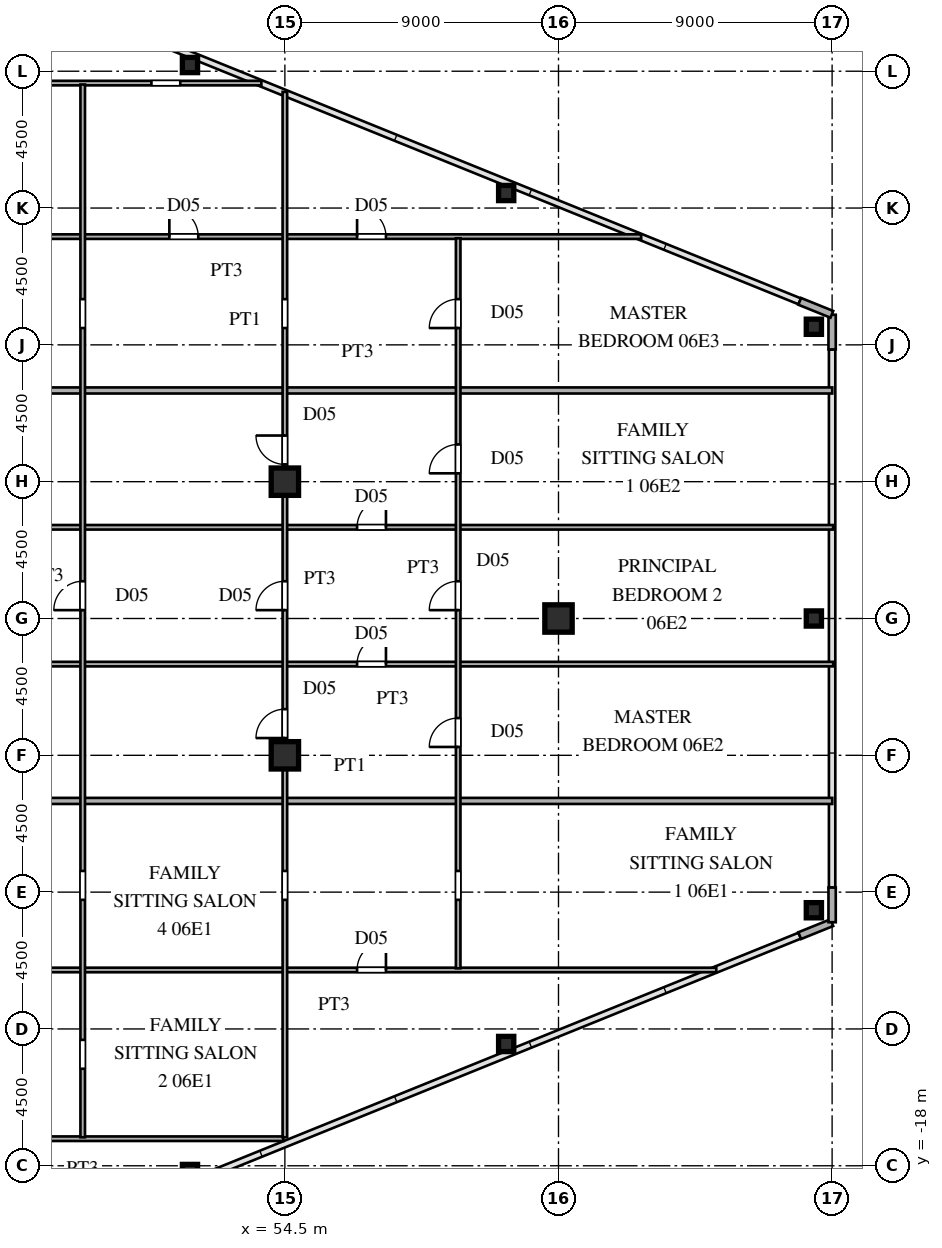
"""IFC4 building model, lengths in metres.
Left out: names, types, materials, properties, quantities, classifications, styles, units other than length and angle.
Written with IfcOpenShell. Run it as: python <this file> out.ifc"""

import sys

from ifc_helpers import new_model, si_unit, direction, frame, frame_2d, origin, origin_2d, place, context, subcontext, project, spatial, rectangle, hollow_rectangle, i_section, extrude, source, transform, mapped, element, fill, save


model = new_model("IFC4")
c1 = context("Model", 3, precision=1e-05, world=origin(), true_north=direction((0.0, 1.0)))
c2 = subcontext(c1, "Body", "Model", "MODEL_VIEW")
j1 = project(units=[si_unit("LENGTHUNIT", "METRE"), si_unit("PLANEANGLEUNIT", "RADIAN")], contexts=[c1])
p1 = place(None, origin())
s1 = spatial("IfcSite", under=j1, at=p1, CompositionType="ELEMENT")
p2 = place(p1, origin())
s2 = spatial("IfcBuilding", under=s1, at=p2, CompositionType="ELEMENT")
p3 = place(p2, frame((0.0, 0.0, 26.1)))
s3 = spatial("IfcBuildingStorey", under=s2, at=p3, CompositionType="ELEMENT", Elevation=26.1)
m1 = source(origin(), c2, "Body", "SweptSolid", [
    extrude(i_section(OverallWidth=0.9, OverallDepth=0.9, WebThickness=0.036, FlangeThickness=0.055, at=origin_2d()), origin(), (0.0, 0.0, 1.0), 3.6),
])
for number, where, z_axis, x_axis in (
    (1, (54.5, -4.5, 0.0), (0.0, 0.0, 1.0), (1.0, 0.0, 0.0)),
    (2, (54.5, 4.5, 0.0), (0.0, 0.0, 1.0), (1.0, 0.0, 0.0)),
    (3, (63.5, 0.0, 0.0), (0.0, 0.0, 1.0), (1.0, 0.0, 0.0)),
):
    element("IfcColumn", number, at=place(p3, frame(where, z_axis=z_axis, x_axis=x_axis)), inside=s3, PredefinedType="COLUMN", context=c2, shape_type="MappedRepresentation", body=[
        mapped(m1, transform((0.0, 0.0, 0.0), scale=1.0)),
    ])
m2 = source(origin(), c2, "Body", "SweptSolid", [
    extrude(hollow_rectangle(XDim=0.5, YDim=0.5, WallThickness=0.02, at=origin_2d()), origin(), (0.0, 0.0, 1.0), 3.6),
])
for number, where, z_axis, x_axis in (
    (4, (71.9, -9.596, 0.0), (0.0, 0.0, 1.0), (1.0, 0.0, 0.0)),
    (5, (71.9, 9.596, 0.0), (0.0, 0.0, 1.0), (1.0, 0.0, 0.0)),
    (6, (51.378, -18.204, 0.0), (0.0, 0.0, 1.0), (1.0, 0.0, 0.0)),
    (7, (61.779, -13.994, 0.0), (0.0, 0.0, 1.0), (1.0, 0.0, 0.0)),
    (8, (51.378, 18.204, 0.0), (0.0, 0.0, 1.0), (1.0, 0.0, 0.0)),
    (9, (61.779, 13.994, 0.0), (0.0, 0.0, 1.0), (1.0, 0.0, 0.0)),
    (10, (71.9, 0.0, 0.0), (0.0, 0.0, 1.0), (1.0, 0.0, 0.0)),
):
    element("IfcColumn", number, at=place(p3, frame(where, z_axis=z_axis, x_axis=x_axis)), inside=s3, PredefinedType="COLUMN", context=c2, shape_type="MappedRepresentation", body=[
        mapped(m2, transform((0.0, 0.0, 0.0), scale=1.0)),
    ])
for number, where, z_axis, x_axis in (
    (11, (71.434, -10.431, 0.0), (0.0, 0.0, 1.0), (0.927, 0.375, 0.0)),
    (12, (72.5, -9.99, 0.0), (0.0, 0.0, 1.0), (0.0, 1.0, 0.0)),
    (13, (72.5, 8.85, 0.0), (0.0, 0.0, 1.0), (0.0, 1.0, 0.0)),
    (14, (72.491, 10.004, 0.0), (0.0, 0.0, 1.0), (-0.927, 0.375, 0.0)),
):
    element("IfcWall", number, at=place(p3, frame(where, z_axis=z_axis, x_axis=x_axis)), inside=s3, PredefinedType="SOLIDWALL", context=c2, shape_type="SweptSolid", body=[
        extrude(rectangle(XDim=1.14, YDim=0.24, at=frame_2d((0.57, 0.0))), origin(), (0.0, 0.0, 1.0), 3.38),
    ])
p4 = place(p3, frame((41.25, -17.11, 0.0), z_axis=(0.0, 0.0, 1.0), x_axis=(1.0, 0.0, 0.0)))
e15 = element("IfcWall", 15, at=p4, inside=s3, PredefinedType="PARTITIONING", context=c2, shape_type="SweptSolid", body=[
    extrude(rectangle(XDim=13.2, YDim=0.15, at=frame_2d((6.6, 0.0))), origin(), (0.0, 0.0, 1.0), 3.38),
])
p5 = place(p4, frame((2.8, 0.0, 0.0)))
e16 = element("IfcOpeningElement", 16, at=p5, cuts=e15, PredefinedType="OPENING", context=c2, shape_type="SweptSolid", body=[
    extrude(rectangle(XDim=0.95, YDim=2.15, at=frame_2d((0.475, 1.075))), frame((0.0, 0.085, 0.0), z_axis=(0.0, -1.0, 0.0), x_axis=(1.0, 0.0, 0.0)), (0.0, 0.0, 1.0), 0.17),
])
p6 = place(p3, frame((41.25, -11.56, 0.0), z_axis=(0.0, 0.0, 1.0), x_axis=(1.0, 0.0, 0.0)))
e17 = element("IfcWall", 17, at=p6, inside=s3, PredefinedType="PARTITIONING", context=c2, shape_type="SweptSolid", body=[
    extrude(rectangle(XDim=27.44, YDim=0.15, at=frame_2d((13.72, 0.0))), origin(), (0.0, 0.0, 1.0), 3.38),
])
p7 = place(p6, frame((2.8, 0.0, 0.0)))
e18 = element("IfcOpeningElement", 18, at=p7, cuts=e17, PredefinedType="OPENING", context=c2, shape_type="SweptSolid", body=[
    extrude(rectangle(XDim=0.95, YDim=2.15, at=frame_2d((0.475, 1.075))), frame((0.0, 0.085, 0.0), z_axis=(0.0, -1.0, 0.0), x_axis=(1.0, 0.0, 0.0)), (0.0, 0.0, 1.0), 0.17),
])
p8 = place(p6, frame((15.625, 0.0, 0.0)))
e19 = element("IfcOpeningElement", 19, at=p8, cuts=e17, PredefinedType="OPENING", context=c2, shape_type="SweptSolid", body=[
    extrude(rectangle(XDim=0.95, YDim=2.15, at=frame_2d((0.475, 1.075))), frame((0.0, 0.085, 0.0), z_axis=(0.0, -1.0, 0.0), x_axis=(1.0, 0.0, 0.0)), (0.0, 0.0, 1.0), 0.17),
])
p9 = place(p3, frame((38.48, -6.0, 0.0), z_axis=(0.0, 0.0, 1.0), x_axis=(1.0, 0.0, 0.0)))
e20 = element("IfcWall", 20, at=p9, inside=s3, PredefinedType="PARTITIONING", context=c2, shape_type="SweptSolid", body=[
    extrude(rectangle(XDim=34.025, YDim=0.2, at=frame_2d((17.012, 0.0))), origin(), (0.0, 0.0, 1.0), 3.38),
])
p10 = place(p3, frame((41.25, -1.5, 0.0), z_axis=(0.0, 0.0, 1.0), x_axis=(1.0, 0.0, 0.0)))
e21 = element("IfcWall", 21, at=p10, inside=s3, PredefinedType="PARTITIONING", context=c2, shape_type="SweptSolid", body=[
    extrude(rectangle(XDim=31.285, YDim=0.15, at=frame_2d((15.643, 0.0))), origin(), (0.0, 0.0, 1.0), 3.38),
])
p11 = place(p10, frame((2.8, 0.0, 0.0)))
e22 = element("IfcOpeningElement", 22, at=p11, cuts=e21, PredefinedType="OPENING", context=c2, shape_type="SweptSolid", body=[
    extrude(rectangle(XDim=0.95, YDim=2.15, at=frame_2d((0.475, 1.075))), frame((0.0, 0.085, 0.0), z_axis=(0.0, -1.0, 0.0), x_axis=(1.0, 0.0, 0.0)), (0.0, 0.0, 1.0), 0.17),
])
p12 = place(p10, frame((15.625, 0.0, 0.0)))
e23 = element("IfcOpeningElement", 23, at=p12, cuts=e21, PredefinedType="OPENING", context=c2, shape_type="SweptSolid", body=[
    extrude(rectangle(XDim=0.95, YDim=2.15, at=frame_2d((0.475, 1.075))), frame((0.0, 0.085, 0.0), z_axis=(0.0, -1.0, 0.0), x_axis=(1.0, 0.0, 0.0)), (0.0, 0.0, 1.0), 0.17),
])
p13 = place(p3, frame((41.25, 3.0, 0.0), z_axis=(0.0, 0.0, 1.0), x_axis=(1.0, 0.0, 0.0)))
e24 = element("IfcWall", 24, at=p13, inside=s3, PredefinedType="PARTITIONING", context=c2, shape_type="SweptSolid", body=[
    extrude(rectangle(XDim=31.285, YDim=0.15, at=frame_2d((15.643, 0.0))), origin(), (0.0, 0.0, 1.0), 3.38),
])
p14 = place(p13, frame((2.8, 0.0, 0.0)))
e25 = element("IfcOpeningElement", 25, at=p14, cuts=e24, PredefinedType="OPENING", context=c2, shape_type="SweptSolid", body=[
    extrude(rectangle(XDim=0.95, YDim=2.15, at=frame_2d((0.475, 1.075))), frame((0.0, 0.085, 0.0), z_axis=(0.0, -1.0, 0.0), x_axis=(1.0, 0.0, 0.0)), (0.0, 0.0, 1.0), 0.17),
])
p15 = place(p13, frame((15.625, 0.0, 0.0)))
e26 = element("IfcOpeningElement", 26, at=p15, cuts=e24, PredefinedType="OPENING", context=c2, shape_type="SweptSolid", body=[
    extrude(rectangle(XDim=0.95, YDim=2.15, at=frame_2d((0.475, 1.075))), frame((0.0, 0.085, 0.0), z_axis=(0.0, -1.0, 0.0), x_axis=(1.0, 0.0, 0.0)), (0.0, 0.0, 1.0), 0.17),
])
p16 = place(p3, frame((38.48, 7.5, 0.0), z_axis=(0.0, 0.0, 1.0), x_axis=(1.0, 0.0, 0.0)))
e27 = element("IfcWall", 27, at=p16, inside=s3, PredefinedType="PARTITIONING", context=c2, shape_type="SweptSolid", body=[
    extrude(rectangle(XDim=34.025, YDim=0.2, at=frame_2d((17.012, 0.0))), origin(), (0.0, 0.0, 1.0), 3.38),
])
p17 = place(p3, frame((41.25, 12.56, 0.0), z_axis=(0.0, 0.0, 1.0), x_axis=(1.0, 0.0, 0.0)))
e28 = element("IfcWall", 28, at=p17, inside=s3, PredefinedType="PARTITIONING", context=c2, shape_type="SweptSolid", body=[
    extrude(rectangle(XDim=24.969, YDim=0.15, at=frame_2d((12.484, 0.0))), origin(), (0.0, 0.0, 1.0), 3.38),
])
p18 = place(p17, frame((2.8, 0.0, 0.0)))
e29 = element("IfcOpeningElement", 29, at=p18, cuts=e28, PredefinedType="OPENING", context=c2, shape_type="SweptSolid", body=[
    extrude(rectangle(XDim=0.95, YDim=2.15, at=frame_2d((0.475, 1.075))), frame((0.0, 0.085, 0.0), z_axis=(0.0, -1.0, 0.0), x_axis=(1.0, 0.0, 0.0)), (0.0, 0.0, 1.0), 0.17),
])
p19 = place(p17, frame((15.625, 0.0, 0.0)))
e30 = element("IfcOpeningElement", 30, at=p19, cuts=e28, PredefinedType="OPENING", context=c2, shape_type="SweptSolid", body=[
    extrude(rectangle(XDim=0.95, YDim=2.15, at=frame_2d((0.475, 1.075))), frame((0.0, 0.085, 0.0), z_axis=(0.0, -1.0, 0.0), x_axis=(1.0, 0.0, 0.0)), (0.0, 0.0, 1.0), 0.17),
])
p20 = place(p17, frame((9.45, 0.0, 0.0)))
e31 = element("IfcOpeningElement", 31, at=p20, cuts=e28, PredefinedType="OPENING", context=c2, shape_type="SweptSolid", body=[
    extrude(rectangle(XDim=0.95, YDim=2.15, at=frame_2d((0.475, 1.075))), frame((0.0, 0.085, 0.0), z_axis=(0.0, -1.0, 0.0), x_axis=(1.0, 0.0, 0.0)), (0.0, 0.0, 1.0), 0.17),
])
p21 = place(p3, frame((41.25, 17.61, 0.0), z_axis=(0.0, 0.0, 1.0), x_axis=(1.0, 0.0, 0.0)))
e32 = element("IfcWall", 32, at=p21, inside=s3, PredefinedType="PARTITIONING", context=c2, shape_type="SweptSolid", body=[
    extrude(rectangle(XDim=12.477, YDim=0.15, at=frame_2d((6.239, 0.0))), origin(), (0.0, 0.0, 1.0), 3.38),
])
p22 = place(p21, frame((8.86, 0.0, 0.0)))
e33 = element("IfcOpeningElement", 33, at=p22, cuts=e32, PredefinedType="OPENING", context=c2, shape_type="SweptSolid", body=[
    extrude(rectangle(XDim=0.95, YDim=2.15, at=frame_2d((0.475, 1.075))), frame((0.0, 0.085, 0.0), z_axis=(0.0, -1.0, 0.0), x_axis=(1.0, 0.0, 0.0)), (0.0, 0.0, 1.0), 0.17),
])
p23 = place(p3, frame((47.85, -17.063, 0.0), z_axis=(0.0, 0.0, 1.0), x_axis=(0.0, 1.0, 0.0)))
e34 = element("IfcWall", 34, at=p23, inside=s3, PredefinedType="PARTITIONING", context=c2, shape_type="SweptSolid", body=[
    extrude(rectangle(XDim=34.626, YDim=0.15, at=frame_2d((17.313, 0.0))), origin(), (0.0, 0.0, 1.0), 3.38),
])
p24 = place(p23, frame((7.81, 0.0, 0.0)))
e35 = element("IfcOpeningElement", 35, at=p24, cuts=e34, PredefinedType="OPENING", context=c2, shape_type="SweptSolid", body=[
    extrude(rectangle(XDim=0.95, YDim=2.15, at=frame_2d((0.475, 1.075))), frame((0.0, 0.085, 0.0), z_axis=(0.0, -1.0, 0.0), x_axis=(1.0, 0.0, 0.0)), (0.0, 0.0, 1.0), 0.17),
])
p25 = place(p23, frame((2.253, 0.0, 0.0)))
e36 = element("IfcOpeningElement", 36, at=p25, cuts=e34, PredefinedType="OPENING", context=c2, shape_type="SweptSolid", body=[
    extrude(rectangle(XDim=0.95, YDim=2.15, at=frame_2d((0.475, 1.075))), frame((0.0, 0.085, 0.0), z_axis=(0.0, -1.0, 0.0), x_axis=(1.0, 0.0, 0.0)), (0.0, 0.0, 1.0), 0.17),
])
p26 = place(p23, frame((17.338, 0.0, 0.0)))
e37 = element("IfcOpeningElement", 37, at=p26, cuts=e34, PredefinedType="OPENING", context=c2, shape_type="SweptSolid", body=[
    extrude(rectangle(XDim=0.95, YDim=2.15, at=frame_2d((0.475, 1.075))), frame((0.0, 0.085, 0.0), z_axis=(0.0, -1.0, 0.0), x_axis=(1.0, 0.0, 0.0)), (0.0, 0.0, 1.0), 0.17),
])
p27 = place(p23, frame((26.616, 0.0, 0.0)))
e38 = element("IfcOpeningElement", 38, at=p27, cuts=e34, PredefinedType="OPENING", context=c2, shape_type="SweptSolid", body=[
    extrude(rectangle(XDim=0.95, YDim=2.15, at=frame_2d((0.475, 1.075))), frame((0.0, 0.085, 0.0), z_axis=(0.0, -1.0, 0.0), x_axis=(1.0, 0.0, 0.0)), (0.0, 0.0, 1.0), 0.17),
])
p28 = place(p3, frame((54.5, -17.063, 0.0), z_axis=(0.0, 0.0, 1.0), x_axis=(0.0, 1.0, 0.0)))
e39 = element("IfcWall", 39, at=p28, inside=s3, PredefinedType="PARTITIONING", context=c2, shape_type="SweptSolid", body=[
    extrude(rectangle(XDim=34.384, YDim=0.15, at=frame_2d((17.192, 0.0))), origin(), (0.0, 0.0, 1.0), 2.68),
])
p29 = place(p28, frame((7.81, 0.0, 0.0)))
e40 = element("IfcOpeningElement", 40, at=p29, cuts=e39, PredefinedType="OPENING", context=c2, shape_type="SweptSolid", body=[
    extrude(rectangle(XDim=0.95, YDim=2.15, at=frame_2d((0.475, 1.075))), frame((0.0, 0.085, 0.0), z_axis=(0.0, -1.0, 0.0), x_axis=(1.0, 0.0, 0.0)), (0.0, 0.0, 1.0), 0.17),
])
p30 = place(p28, frame((17.338, 0.0, 0.0)))
e41 = element("IfcOpeningElement", 41, at=p30, cuts=e39, PredefinedType="OPENING", context=c2, shape_type="SweptSolid", body=[
    extrude(rectangle(XDim=0.95, YDim=2.15, at=frame_2d((0.475, 1.075))), frame((0.0, 0.085, 0.0), z_axis=(0.0, -1.0, 0.0), x_axis=(1.0, 0.0, 0.0)), (0.0, 0.0, 1.0), 0.17),
])
p31 = place(p28, frame((13.131, 0.0, 0.0)))
e42 = element("IfcOpeningElement", 42, at=p31, cuts=e39, PredefinedType="OPENING", context=c2, shape_type="SweptSolid", body=[
    extrude(rectangle(XDim=0.95, YDim=2.15, at=frame_2d((0.475, 1.075))), frame((0.0, 0.085, 0.0), z_axis=(0.0, -1.0, 0.0), x_axis=(1.0, 0.0, 0.0)), (0.0, 0.0, 1.0), 0.17),
])
p32 = place(p28, frame((22.131, 0.0, 0.0)))
e43 = element("IfcOpeningElement", 43, at=p32, cuts=e39, PredefinedType="OPENING", context=c2, shape_type="SweptSolid", body=[
    extrude(rectangle(XDim=0.95, YDim=2.15, at=frame_2d((0.475, 1.075))), frame((0.0, 0.085, 0.0), z_axis=(0.0, -1.0, 0.0), x_axis=(1.0, 0.0, 0.0)), (0.0, 0.0, 1.0), 0.17),
])
p33 = place(p28, frame((26.616, 0.0, 0.0)))
e44 = element("IfcOpeningElement", 44, at=p33, cuts=e39, PredefinedType="OPENING", context=c2, shape_type="SweptSolid", body=[
    extrude(rectangle(XDim=0.95, YDim=2.15, at=frame_2d((0.475, 1.075))), frame((0.0, 0.085, 0.0), z_axis=(0.0, -1.0, 0.0), x_axis=(1.0, 0.0, 0.0)), (0.0, 0.0, 1.0), 0.17),
])
p34 = place(p3, frame((60.2, -11.506, 0.0), z_axis=(0.0, 0.0, 1.0), x_axis=(0.0, 1.0, 0.0)))
e45 = element("IfcWall", 45, at=p34, inside=s3, PredefinedType="PARTITIONING", context=c2, shape_type="SweptSolid", body=[
    extrude(rectangle(XDim=24.012, YDim=0.15, at=frame_2d((12.006, 0.0))), origin(), (0.0, 0.0, 1.0), 3.38),
])
p35 = place(p34, frame((2.253, 0.0, 0.0)))
e46 = element("IfcOpeningElement", 46, at=p35, cuts=e45, PredefinedType="OPENING", context=c2, shape_type="SweptSolid", body=[
    extrude(rectangle(XDim=0.95, YDim=2.15, at=frame_2d((0.475, 1.075))), frame((0.0, 0.085, 0.0), z_axis=(0.0, -1.0, 0.0), x_axis=(1.0, 0.0, 0.0)), (0.0, 0.0, 1.0), 0.17),
])
p36 = place(p34, frame((7.281, 0.0, 0.0)))
e47 = element("IfcOpeningElement", 47, at=p36, cuts=e45, PredefinedType="OPENING", context=c2, shape_type="SweptSolid", body=[
    extrude(rectangle(XDim=0.95, YDim=2.15, at=frame_2d((0.475, 1.075))), frame((0.0, 0.085, 0.0), z_axis=(0.0, -1.0, 0.0), x_axis=(1.0, 0.0, 0.0)), (0.0, 0.0, 1.0), 0.17),
])
p37 = place(p34, frame((11.781, 0.0, 0.0)))
e48 = element("IfcOpeningElement", 48, at=p37, cuts=e45, PredefinedType="OPENING", context=c2, shape_type="SweptSolid", body=[
    extrude(rectangle(XDim=0.95, YDim=2.15, at=frame_2d((0.475, 1.075))), frame((0.0, 0.085, 0.0), z_axis=(0.0, -1.0, 0.0), x_axis=(1.0, 0.0, 0.0)), (0.0, 0.0, 1.0), 0.17),
])
p38 = place(p34, frame((16.281, 0.0, 0.0)))
e49 = element("IfcOpeningElement", 49, at=p38, cuts=e45, PredefinedType="OPENING", context=c2, shape_type="SweptSolid", body=[
    extrude(rectangle(XDim=0.95, YDim=2.15, at=frame_2d((0.475, 1.075))), frame((0.0, 0.085, 0.0), z_axis=(0.0, -1.0, 0.0), x_axis=(1.0, 0.0, 0.0)), (0.0, 0.0, 1.0), 0.17),
])
p39 = place(p34, frame((21.059, 0.0, 0.0)))
e50 = element("IfcOpeningElement", 50, at=p39, cuts=e45, PredefinedType="OPENING", context=c2, shape_type="SweptSolid", body=[
    extrude(rectangle(XDim=0.95, YDim=2.15, at=frame_2d((0.475, 1.075))), frame((0.0, 0.085, 0.0), z_axis=(0.0, -1.0, 0.0), x_axis=(1.0, 0.0, 0.0)), (0.0, 0.0, 1.0), 0.17),
])
m3 = source(origin(), c2, "Body", "SweptSolid", [
    extrude(rectangle(XDim=0.95, YDim=2.15, at=frame_2d((0.475, 1.075))), frame((0.0, 0.025, 0.0), z_axis=(0.0, -1.0, 0.0), x_axis=(1.0, 0.0, 0.0)), (0.0, 0.0, 1.0), 0.05),
])
p40 = place(p8, origin())
e51 = element("IfcDoor", 51, at=p40, inside=s3, OperationType="SINGLE_SWING_RIGHT", PredefinedType="DOOR", context=c2, shape_type="MappedRepresentation", body=[
    mapped(m3, transform((0.0, 0.0, 0.0), scale=1.0)),
])
fill(e19, e51)
p41 = place(p12, origin())
e52 = element("IfcDoor", 52, at=p41, inside=s3, OperationType="SINGLE_SWING_RIGHT", PredefinedType="DOOR", context=c2, shape_type="MappedRepresentation", body=[
    mapped(m3, transform((0.0, 0.0, 0.0), scale=1.0)),
])
fill(e23, e52)
p42 = place(p15, origin())
e53 = element("IfcDoor", 53, at=p42, inside=s3, OperationType="SINGLE_SWING_RIGHT", PredefinedType="DOOR", context=c2, shape_type="MappedRepresentation", body=[
    mapped(m3, transform((0.0, 0.0, 0.0), scale=1.0)),
])
fill(e26, e53)
p43 = place(p19, origin())
e54 = element("IfcDoor", 54, at=p43, inside=s3, OperationType="SINGLE_SWING_LEFT", PredefinedType="DOOR", context=c2, shape_type="MappedRepresentation", body=[
    mapped(m3, transform((0.0, 0.0, 0.0), scale=1.0)),
])
fill(e30, e54)
p44 = place(p20, origin())
e55 = element("IfcDoor", 55, at=p44, inside=s3, OperationType="SINGLE_SWING_LEFT", PredefinedType="DOOR", context=c2, shape_type="MappedRepresentation", body=[
    mapped(m3, transform((0.0, 0.0, 0.0), scale=1.0)),
])
fill(e31, e55)
p45 = place(p26, origin())
e56 = element("IfcDoor", 56, at=p45, inside=s3, OperationType="SINGLE_SWING_LEFT", PredefinedType="DOOR", context=c2, shape_type="MappedRepresentation", body=[
    mapped(m3, transform((0.0, 0.0, 0.0), scale=1.0)),
])
fill(e37, e56)
p46 = place(p30, origin())
e57 = element("IfcDoor", 57, at=p46, inside=s3, OperationType="SINGLE_SWING_LEFT", PredefinedType="DOOR", context=c2, shape_type="MappedRepresentation", body=[
    mapped(m3, transform((0.0, 0.0, 0.0), scale=1.0)),
])
fill(e41, e57)
p47 = place(p31, origin())
e58 = element("IfcDoor", 58, at=p47, inside=s3, OperationType="SINGLE_SWING_LEFT", PredefinedType="DOOR", context=c2, shape_type="MappedRepresentation", body=[
    mapped(m3, transform((0.0, 0.0, 0.0), scale=1.0)),
])
fill(e42, e58)
p48 = place(p32, origin())
e59 = element("IfcDoor", 59, at=p48, inside=s3, OperationType="SINGLE_SWING_RIGHT", PredefinedType="DOOR", context=c2, shape_type="MappedRepresentation", body=[
    mapped(m3, transform((0.0, 0.0, 0.0), scale=1.0)),
])
fill(e43, e59)
p49 = place(p36, origin())
e60 = element("IfcDoor", 60, at=p49, inside=s3, OperationType="SINGLE_SWING_LEFT", PredefinedType="DOOR", context=c2, shape_type="MappedRepresentation", body=[
    mapped(m3, transform((0.0, 0.0, 0.0), scale=1.0)),
])
fill(e47, e60)
p50 = place(p37, origin())
e61 = element("IfcDoor", 61, at=p50, inside=s3, OperationType="SINGLE_SWING_LEFT", PredefinedType="DOOR", context=c2, shape_type="MappedRepresentation", body=[
    mapped(m3, transform((0.0, 0.0, 0.0), scale=1.0)),
])
fill(e48, e61)
p51 = place(p38, origin())
e62 = element("IfcDoor", 62, at=p51, inside=s3, OperationType="SINGLE_SWING_LEFT", PredefinedType="DOOR", context=c2, shape_type="MappedRepresentation", body=[
    mapped(m3, transform((0.0, 0.0, 0.0), scale=1.0)),
])
fill(e49, e62)
p52 = place(p39, origin())
e63 = element("IfcDoor", 63, at=p52, inside=s3, OperationType="SINGLE_SWING_LEFT", PredefinedType="DOOR", context=c2, shape_type="MappedRepresentation", body=[
    mapped(m3, transform((0.0, 0.0, 0.0), scale=1.0)),
])
fill(e50, e63)
save(model, sys.argv[1])
